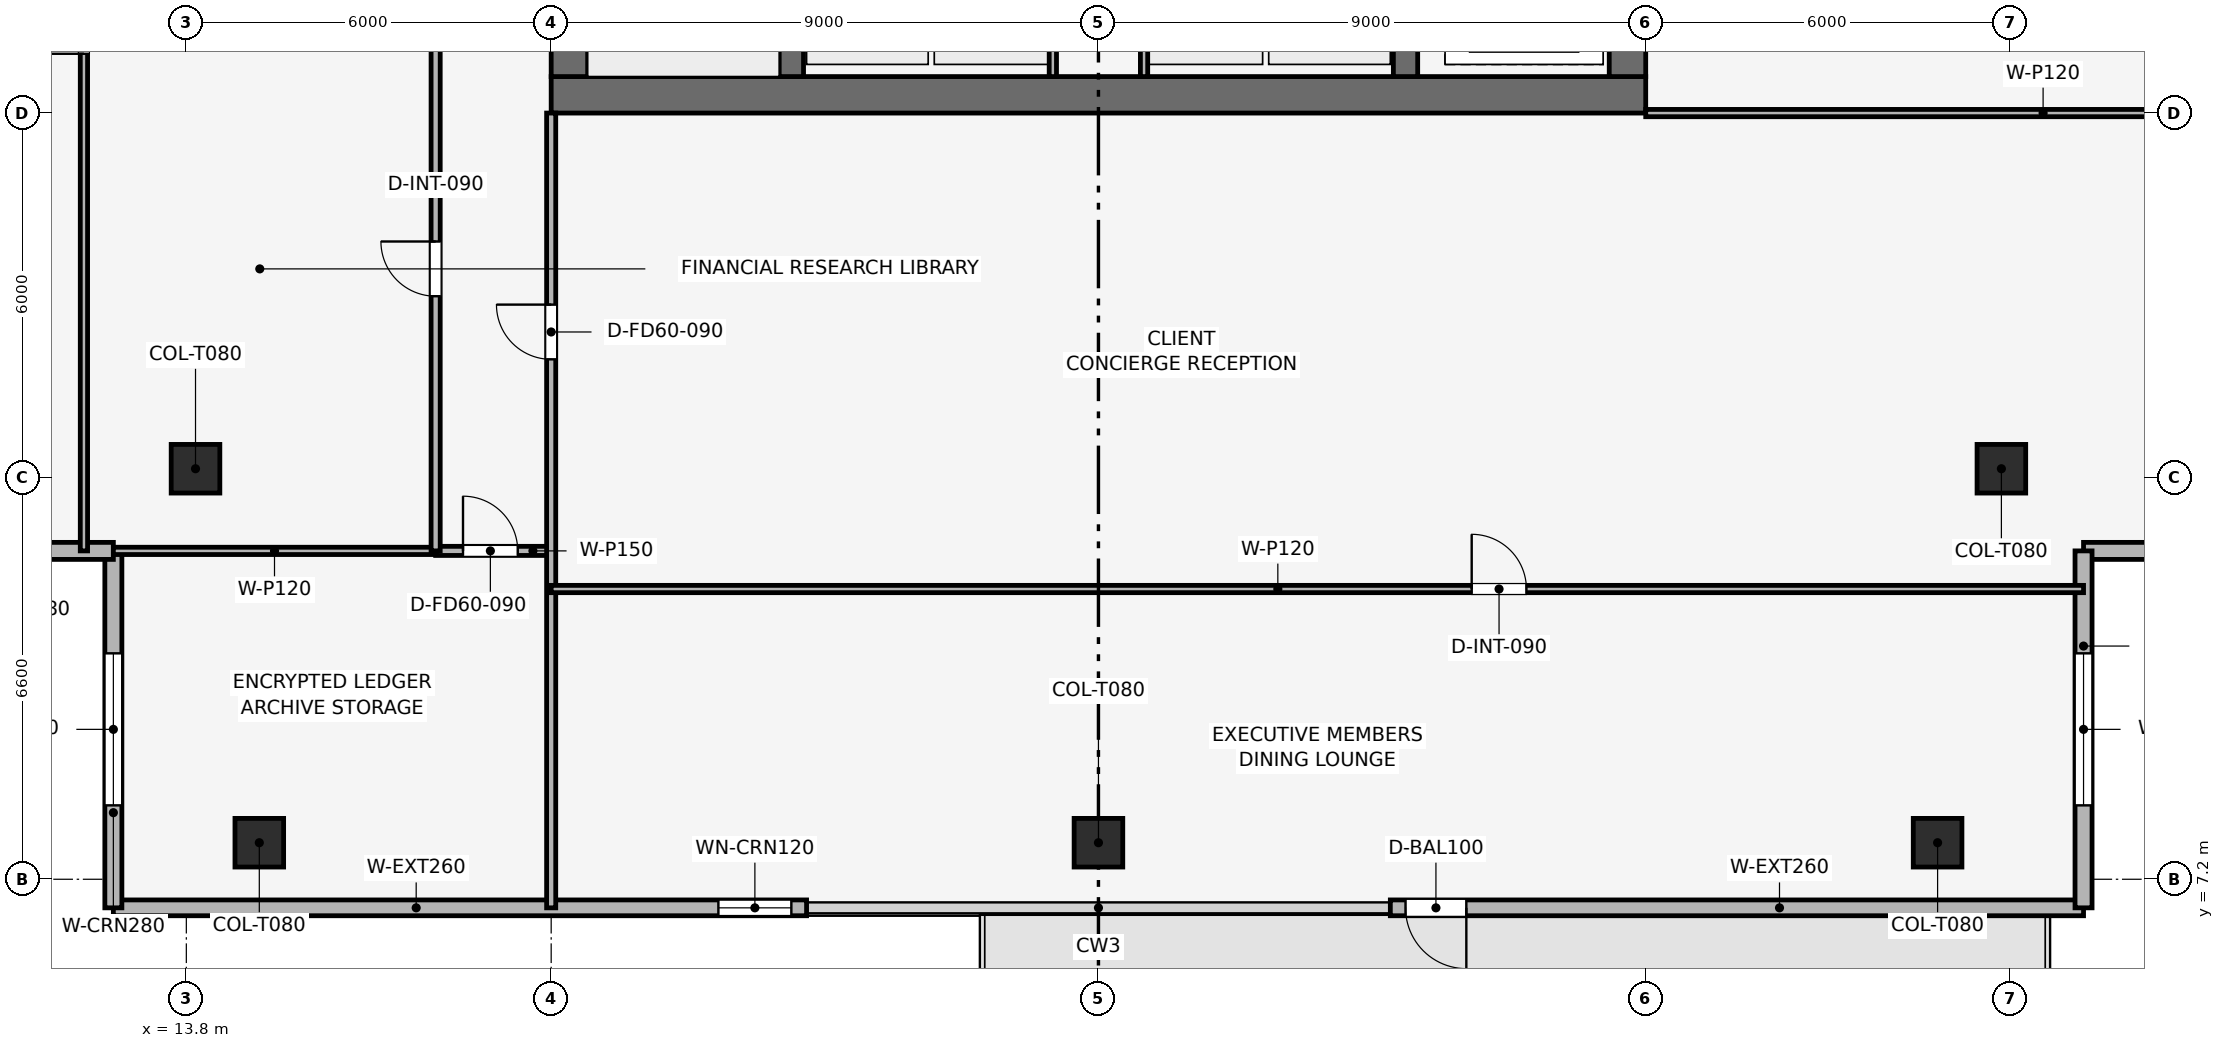
"""IFC4 building model, lengths in metres.
Left out: names, types, materials, properties, quantities, classifications, styles, units other than length and angle.
Written with IfcOpenShell. Run it as: python <this file> out.ifc"""

import sys

from ifc_helpers import new_model, si_unit, direction, frame, frame_2d, origin, origin_2d, place, context, subcontext, project, spatial, rectangle, extrude, element, fill, save


model = new_model("IFC4")
c1 = context("Model", 3, precision=1e-05, world=origin(), true_north=direction((0.0, 1.0)))
c2 = subcontext(c1, "Body", "Model", "MODEL_VIEW")
j1 = project(units=[si_unit("LENGTHUNIT", "METRE"), si_unit("PLANEANGLEUNIT", "RADIAN")], contexts=[c1])
p1 = place(None, origin())
s1 = spatial("IfcSite", under=j1, at=p1, CompositionType="ELEMENT")
p2 = place(p1, origin())
s2 = spatial("IfcBuilding", under=s1, at=p2, CompositionType="ELEMENT")
p3 = place(p2, frame((0.0, 0.0, 340.5)))
s3 = spatial("IfcBuildingStorey", under=s2, at=p3, CompositionType="ELEMENT", Elevation=340.5)
p4 = place(p3, frame((19.8, 20.1, 0.0), z_axis=(0.0, 0.0, 1.0), x_axis=(1.0, 0.0, 0.0)))
e1 = element("IfcWall", 1, at=p4, inside=s3, PredefinedType="SHEAR", context=c2, shape_type="SweptSolid", body=[
    extrude(rectangle(XDim=18.0, YDim=0.6, at=frame_2d((9.0, 0.0))), origin(), (0.0, 0.0, 1.0), 3.75),
])
p5 = place(p3, frame((20.1, 20.4, 0.0), z_axis=(0.0, 0.0, 1.0), x_axis=(0.0, 1.0, 0.0)))
e2 = element("IfcWall", 2, at=p5, inside=s3, PredefinedType="SHEAR", context=c2, shape_type="SweptSolid", body=[
    extrude(rectangle(XDim=16.8, YDim=0.6, at=frame_2d((8.4, 0.0))), origin(), (0.0, 0.0, 1.0), 3.75),
])
p6 = place(p5, frame((10.4, 0.0, 0.0)))
e3 = element("IfcOpeningElement", 3, at=p6, cuts=e2, PredefinedType="OPENING", context=c2, shape_type="SweptSolid", body=[
    extrude(rectangle(XDim=1.1, YDim=2.15, at=frame_2d((0.55, 1.075))), frame((0.0, 0.31, 0.0), z_axis=(0.0, -1.0, 0.0), x_axis=(1.0, 0.0, 0.0)), (0.0, 0.0, 1.0), 0.62),
])
p7 = place(p3, frame((37.5, 20.4, 0.0), z_axis=(0.0, 0.0, 1.0), x_axis=(0.0, 1.0, 0.0)))
e4 = element("IfcWall", 4, at=p7, inside=s3, PredefinedType="SHEAR", context=c2, shape_type="SweptSolid", body=[
    extrude(rectangle(XDim=16.8, YDim=0.6, at=frame_2d((8.4, 0.0))), origin(), (0.0, 0.0, 1.0), 3.75),
])
p8 = place(p7, frame((4.9, 0.0, 0.0)))
e5 = element("IfcOpeningElement", 5, at=p8, cuts=e4, PredefinedType="OPENING", context=c2, shape_type="SweptSolid", body=[
    extrude(rectangle(XDim=1.1, YDim=2.15, at=frame_2d((0.55, 1.075))), frame((0.0, 0.31, 0.0), z_axis=(0.0, -1.0, 0.0), x_axis=(1.0, 0.0, 0.0)), (0.0, 0.0, 1.0), 0.62),
])
for number, where, z_axis, x_axis in (
    (6, (23.75, 20.4, 0.0), (0.0, 0.0, 1.0), (0.0, 1.0, 0.0)),
    (7, (33.85, 20.4, 0.0), (0.0, 0.0, 1.0), (0.0, 1.0, 0.0)),
):
    element("IfcWall", number, at=place(p3, frame(where, z_axis=z_axis, x_axis=x_axis)), inside=s3, PredefinedType="SHEAR", context=c2, shape_type="SweptSolid", body=[
        extrude(rectangle(XDim=16.8, YDim=0.4, at=frame_2d((8.4, 0.0))), origin(), (0.0, 0.0, 1.0), 3.75),
    ])
p9 = place(p3, frame((15.0, 7.801, 0.003), z_axis=(0.026074003672, 0.233311539355, 0.972052401847), x_axis=(-0.993813171993, 0.111064752168, 0.0)))
e8 = element("IfcColumn", 8, at=p9, inside=s3, PredefinedType="COLUMN", context=c2, shape_type="SweptSolid", body=[
    extrude(rectangle(XDim=0.8, YDim=0.8, at=origin_2d()), origin(), (0.0, 0.0, 1.0), 3.605),
])
p10 = place(p3, frame((28.8, 7.801, 0.003), z_axis=(0.0, 0.23339088867, 0.972382997119), x_axis=(-1.0, 0.0, 0.0)))
e9 = element("IfcColumn", 9, at=p10, inside=s3, PredefinedType="COLUMN", context=c2, shape_type="SweptSolid", body=[
    extrude(rectangle(XDim=0.8, YDim=0.8, at=origin_2d()), origin(), (0.0, 0.0, 1.0), 3.604),
])
p11 = place(p3, frame((42.6, 7.801, 0.003), z_axis=(-0.026074003672, 0.233311539355, 0.972052401847), x_axis=(-0.993813171993, -0.111064752168, 0.0)))
e10 = element("IfcColumn", 10, at=p11, inside=s3, PredefinedType="COLUMN", context=c2, shape_type="SweptSolid", body=[
    extrude(rectangle(XDim=0.8, YDim=0.8, at=origin_2d()), origin(), (0.0, 0.0, 1.0), 3.605),
])
p12 = place(p3, frame((13.951, 13.951, 0.003), z_axis=(0.180469443862, 0.180469443862, 0.966882391847), x_axis=(-0.707106781187, 0.707106781187, 0.0)))
e11 = element("IfcColumn", 11, at=p12, inside=s3, PredefinedType="COLUMN", context=c2, shape_type="SweptSolid", body=[
    extrude(rectangle(XDim=0.8, YDim=0.8, at=origin_2d()), origin(), (0.0, 0.0, 1.0), 3.624),
])
p13 = place(p3, frame((43.649, 13.951, 0.003), z_axis=(-0.180404272202, 0.180471637502, 0.966894144479), x_axis=(-0.70723876565, -0.706974772083, 0.0)))
e12 = element("IfcColumn", 12, at=p13, inside=s3, PredefinedType="COLUMN", context=c2, shape_type="SweptSolid", body=[
    extrude(rectangle(XDim=0.8, YDim=0.8, at=origin_2d()), origin(), (0.0, 0.0, 1.0), 3.624),
])
p14 = place(p3, frame((45.0, 6.73, 0.0), z_axis=(0.0, 0.0, 1.0), x_axis=(-1.0, 0.0, 0.0)))
e13 = element("IfcWall", 13, at=p14, inside=s3, PredefinedType="SOLIDWALL", context=c2, shape_type="SweptSolid", body=[
    extrude(rectangle(XDim=11.4, YDim=0.26, at=frame_2d((5.7, 0.0))), origin(), (0.0, 0.0, 1.0), 3.51),
])
p15 = place(p14, frame((10.15, 0.0, 0.0)))
e14 = element("IfcOpeningElement", 14, at=p15, cuts=e13, PredefinedType="OPENING", context=c2, shape_type="SweptSolid", body=[
    extrude(rectangle(XDim=1.0, YDim=2.2, at=frame_2d((0.5, 1.1))), frame((0.0, 0.14, 0.0), z_axis=(0.0, -1.0, 0.0), x_axis=(1.0, 0.0, 0.0)), (0.0, 0.0, 1.0), 0.28),
])
p16 = place(p3, frame((24.0, 6.73, 0.0), z_axis=(0.0, 0.0, 1.0), x_axis=(-1.0, 0.0, 0.0)))
e15 = element("IfcWall", 15, at=p16, inside=s3, PredefinedType="SOLIDWALL", context=c2, shape_type="SweptSolid", body=[
    extrude(rectangle(XDim=11.4, YDim=0.26, at=frame_2d((5.7, 0.0))), origin(), (0.0, 0.0, 1.0), 3.51),
])
p17 = place(p16, frame((0.25, 0.0, 0.9)))
e16 = element("IfcOpeningElement", 16, at=p17, cuts=e15, PredefinedType="OPENING", context=c2, shape_type="SweptSolid", body=[
    extrude(rectangle(XDim=1.2, YDim=2.1, at=frame_2d((0.6, 1.05))), frame((0.0, 0.14, 0.0), z_axis=(0.0, -1.0, 0.0), x_axis=(1.0, 0.0, 0.0)), (0.0, 0.0, 1.0), 0.28),
])
p18 = place(p3, frame((12.6, 6.73, 0.0), z_axis=(0.0, 0.0, 1.0), x_axis=(0.0, 1.0, 0.0)))
e17 = element("IfcWall", 17, at=p18, inside=s3, PredefinedType="SOLIDWALL", context=c2, shape_type="SweptSolid", body=[
    extrude(rectangle(XDim=5.87, YDim=0.28, at=frame_2d((2.935, 0.0))), origin(), (0.0, 0.0, 1.0), 3.51),
])
p19 = place(p18, frame((1.685, 0.0, 0.9)))
e18 = element("IfcOpeningElement", 18, at=p19, cuts=e17, PredefinedType="OPENING", context=c2, shape_type="SweptSolid", body=[
    extrude(rectangle(XDim=2.5, YDim=1.9, at=frame_2d((1.25, 0.95))), frame((0.0, 0.15, 0.0), z_axis=(0.0, -1.0, 0.0), x_axis=(1.0, 0.0, 0.0)), (0.0, 0.0, 1.0), 0.3),
])
p20 = place(p3, frame((12.6, 12.6, 0.0), z_axis=(0.0, 0.0, 1.0), x_axis=(-1.0, 0.0, 0.0)))
e19 = element("IfcWall", 19, at=p20, inside=s3, PredefinedType="SOLIDWALL", context=c2, shape_type="SweptSolid", body=[
    extrude(rectangle(XDim=5.87, YDim=0.28, at=frame_2d((2.935, 0.0))), origin(), (0.0, 0.0, 1.0), 3.51),
])
p21 = place(p20, frame((1.685, 0.0, 0.9)))
e20 = element("IfcOpeningElement", 20, at=p21, cuts=e19, PredefinedType="OPENING", context=c2, shape_type="SweptSolid", body=[
    extrude(rectangle(XDim=2.5, YDim=1.9, at=frame_2d((1.25, 0.95))), frame((0.0, 0.15, 0.0), z_axis=(0.0, -1.0, 0.0), x_axis=(1.0, 0.0, 0.0)), (0.0, 0.0, 1.0), 0.3),
])
p22 = place(p3, frame((50.87, 12.6, 0.0), z_axis=(0.0, 0.0, 1.0), x_axis=(-1.0, 0.0, 0.0)))
e21 = element("IfcWall", 21, at=p22, inside=s3, PredefinedType="SOLIDWALL", context=c2, shape_type="SweptSolid", body=[
    extrude(rectangle(XDim=5.87, YDim=0.28, at=frame_2d((2.935, 0.0))), origin(), (0.0, 0.0, 1.0), 3.51),
])
p23 = place(p22, frame((1.685, 0.0, 0.9)))
e22 = element("IfcOpeningElement", 22, at=p23, cuts=e21, PredefinedType="OPENING", context=c2, shape_type="SweptSolid", body=[
    extrude(rectangle(XDim=2.5, YDim=1.9, at=frame_2d((1.25, 0.95))), frame((0.0, 0.15, 0.0), z_axis=(0.0, -1.0, 0.0), x_axis=(1.0, 0.0, 0.0)), (0.0, 0.0, 1.0), 0.3),
])
p24 = place(p3, frame((45.0, 12.6, 0.0), z_axis=(0.0, 0.0, 1.0), x_axis=(0.0, -1.0, 0.0)))
e23 = element("IfcWall", 23, at=p24, inside=s3, PredefinedType="SOLIDWALL", context=c2, shape_type="SweptSolid", body=[
    extrude(rectangle(XDim=5.87, YDim=0.28, at=frame_2d((2.935, 0.0))), origin(), (0.0, 0.0, 1.0), 3.51),
])
p25 = place(p24, frame((1.685, 0.0, 0.9)))
e24 = element("IfcOpeningElement", 24, at=p25, cuts=e23, PredefinedType="OPENING", context=c2, shape_type="SweptSolid", body=[
    extrude(rectangle(XDim=2.5, YDim=1.9, at=frame_2d((1.25, 0.95))), frame((0.0, 0.15, 0.0), z_axis=(0.0, -1.0, 0.0), x_axis=(1.0, 0.0, 0.0)), (0.0, 0.0, 1.0), 0.3),
])
for number, where, z_axis, x_axis in (
    (25, (28.05, 20.4, 0.0), (0.0, 0.0, 1.0), (0.0, 1.0, 0.0)),
    (26, (29.55, 20.4, 0.0), (0.0, 0.0, 1.0), (0.0, 1.0, 0.0)),
):
    element("IfcWall", number, at=place(p3, frame(where, z_axis=z_axis, x_axis=x_axis)), inside=s3, PredefinedType="PARTITIONING", context=c2, shape_type="SweptSolid", body=[
        extrude(rectangle(XDim=8.15, YDim=0.12, at=frame_2d((4.075, 0.0))), origin(), (0.0, 0.0, 1.0), 3.51),
    ])
p26 = place(p3, frame((12.116, 12.6, 0.0), z_axis=(0.0, 0.0, 1.0), x_axis=(0.0, 1.0, 0.0)))
e27 = element("IfcWall", 27, at=p26, inside=s3, PredefinedType="PARTITIONING", context=c2, shape_type="SweptSolid", body=[
    extrude(rectangle(XDim=9.275, YDim=0.12, at=frame_2d((4.637, 0.0))), origin(), (0.0, 0.0, 1.0), 3.095),
])
p27 = place(p26, frame((8.175, 0.0, 0.0)))
e28 = element("IfcOpeningElement", 28, at=p27, cuts=e27, PredefinedType="OPENING", context=c2, shape_type="SweptSolid", body=[
    extrude(rectangle(XDim=0.9, YDim=2.1, at=frame_2d((0.45, 1.05))), frame((0.0, 0.07, 0.0), z_axis=(0.0, -1.0, 0.0), x_axis=(1.0, 0.0, 0.0)), (0.0, 0.0, 1.0), 0.14),
])
p28 = place(p3, frame((12.6, 12.6, 0.0), z_axis=(0.0, 0.0, 1.0), x_axis=(1.0, 0.0, 0.0)))
e29 = element("IfcWall", 29, at=p28, inside=s3, PredefinedType="PARTITIONING", context=c2, shape_type="SweptSolid", body=[
    extrude(rectangle(XDim=5.3, YDim=0.12, at=frame_2d((2.65, 0.0))), origin(), (0.0, 0.0, 1.0), 3.195),
])
p29 = place(p3, frame((17.9, 12.6, 0.0), z_axis=(0.0, 0.0, 1.0), x_axis=(1.0, 0.0, 0.0)))
e30 = element("IfcWall", 30, at=p29, inside=s3, PredefinedType="PARTITIONING", context=c2, shape_type="SweptSolid", body=[
    extrude(rectangle(XDim=1.9, YDim=0.15, at=frame_2d((0.95, 0.0))), origin(), (0.0, 0.0, 1.0), 3.51),
])
p30 = place(p29, frame((0.45, 0.0, 0.0)))
e31 = element("IfcOpeningElement", 31, at=p30, cuts=e30, PredefinedType="OPENING", context=c2, shape_type="SweptSolid", body=[
    extrude(rectangle(XDim=0.9, YDim=2.1, at=frame_2d((0.45, 1.05))), frame((0.0, 0.085, 0.0), z_axis=(0.0, -1.0, 0.0), x_axis=(1.0, 0.0, 0.0)), (0.0, 0.0, 1.0), 0.17),
])
p31 = place(p3, frame((19.8, 6.73, 0.0), z_axis=(0.0, 0.0, 1.0), x_axis=(0.0, 1.0, 0.0)))
e32 = element("IfcWall", 32, at=p31, inside=s3, PredefinedType="PARTITIONING", context=c2, shape_type="SweptSolid", body=[
    extrude(rectangle(XDim=13.07, YDim=0.15, at=frame_2d((6.535, 0.0))), origin(), (0.0, 0.0, 1.0), 3.095),
])
p32 = place(p31, frame((9.02, 0.0, 0.0)))
e33 = element("IfcOpeningElement", 33, at=p32, cuts=e32, PredefinedType="OPENING", context=c2, shape_type="SweptSolid", body=[
    extrude(rectangle(XDim=0.9, YDim=2.1, at=frame_2d((0.45, 1.05))), frame((0.0, 0.085, 0.0), z_axis=(0.0, -1.0, 0.0), x_axis=(1.0, 0.0, 0.0)), (0.0, 0.0, 1.0), 0.17),
])
p33 = place(p3, frame((19.8, 11.973, 0.0), z_axis=(0.0, 0.0, 1.0), x_axis=(1.0, 0.0, 0.0)))
e34 = element("IfcWall", 34, at=p33, inside=s3, PredefinedType="PARTITIONING", context=c2, shape_type="SweptSolid", body=[
    extrude(rectangle(XDim=25.2, YDim=0.12, at=frame_2d((12.6, 0.0))), origin(), (0.0, 0.0, 1.0), 3.095),
])
p34 = place(p33, frame((15.138, 0.0, 0.0)))
e35 = element("IfcOpeningElement", 35, at=p34, cuts=e34, PredefinedType="OPENING", context=c2, shape_type="SweptSolid", body=[
    extrude(rectangle(XDim=0.9, YDim=2.1, at=frame_2d((0.45, 1.05))), frame((0.0, 0.07, 0.0), z_axis=(0.0, -1.0, 0.0), x_axis=(1.0, 0.0, 0.0)), (0.0, 0.0, 1.0), 0.14),
])
p35 = place(p3, frame((37.8, 19.8, 0.0), z_axis=(0.0, 0.0, 1.0), x_axis=(1.0, 0.0, 0.0)))
e36 = element("IfcWall", 36, at=p35, inside=s3, PredefinedType="PARTITIONING", context=c2, shape_type="SweptSolid", body=[
    extrude(rectangle(XDim=13.07, YDim=0.12, at=frame_2d((6.535, 0.0))), origin(), (0.0, 0.0, 1.0), 3.095),
])
p36 = place(p3, frame((17.9, 12.6, 0.0), z_axis=(0.0, 0.0, 1.0), x_axis=(0.0, 1.0, 0.0)))
e37 = element("IfcWall", 37, at=p36, inside=s3, PredefinedType="PARTITIONING", context=c2, shape_type="SweptSolid", body=[
    extrude(rectangle(XDim=27.1, YDim=0.15, at=frame_2d((13.55, 0.0))), origin(), (0.0, 0.0, 1.0), 3.095),
])
p37 = place(p36, frame((4.188, 0.0, 0.0)))
e38 = element("IfcOpeningElement", 38, at=p37, cuts=e37, PredefinedType="OPENING", context=c2, shape_type="SweptSolid", body=[
    extrude(rectangle(XDim=0.9, YDim=2.1, at=frame_2d((0.45, 1.05))), frame((0.0, 0.085, 0.0), z_axis=(0.0, -1.0, 0.0), x_axis=(1.0, 0.0, 0.0)), (0.0, 0.0, 1.0), 0.17),
])
p38 = place(p36, frame((17.738, 0.0, 0.0)))
e39 = element("IfcOpeningElement", 39, at=p38, cuts=e37, PredefinedType="OPENING", context=c2, shape_type="SweptSolid", body=[
    extrude(rectangle(XDim=0.9, YDim=2.1, at=frame_2d((0.45, 1.05))), frame((0.0, 0.085, 0.0), z_axis=(0.0, -1.0, 0.0), x_axis=(1.0, 0.0, 0.0)), (0.0, 0.0, 1.0), 0.17),
])
p39 = place(p15, origin())
e40 = element("IfcDoor", 40, at=p39, inside=s3, OperationType="SINGLE_SWING_LEFT", PredefinedType="DOOR", context=c2, shape_type="SweptSolid", body=[
    extrude(rectangle(XDim=1.0, YDim=2.2, at=frame_2d((0.5, 1.1))), frame((0.0, 0.025, 0.0), z_axis=(0.0, -1.0, 0.0), x_axis=(1.0, 0.0, 0.0)), (0.0, 0.0, 1.0), 0.05),
])
fill(e14, e40)
p40 = place(p17, origin())
e41 = element("IfcWindow", 41, at=p40, inside=s3, PartitioningType="SINGLE_PANEL", PredefinedType="WINDOW", context=c2, shape_type="SweptSolid", body=[
    extrude(rectangle(XDim=1.2, YDim=2.1, at=frame_2d((0.6, 1.05))), frame((0.0, 0.03, 0.0), z_axis=(0.0, -1.0, 0.0), x_axis=(1.0, 0.0, 0.0)), (0.0, 0.0, 1.0), 0.06),
])
fill(e16, e41)
p41 = place(p19, origin())
e42 = element("IfcWindow", 42, at=p41, inside=s3, PartitioningType="SINGLE_PANEL", PredefinedType="WINDOW", context=c2, shape_type="SweptSolid", body=[
    extrude(rectangle(XDim=2.5, YDim=1.9, at=frame_2d((1.25, 0.95))), frame((0.0, 0.03, 0.0), z_axis=(0.0, -1.0, 0.0), x_axis=(1.0, 0.0, 0.0)), (0.0, 0.0, 1.0), 0.06),
])
fill(e18, e42)
p42 = place(p25, origin())
e43 = element("IfcWindow", 43, at=p42, inside=s3, PartitioningType="SINGLE_PANEL", PredefinedType="WINDOW", context=c2, shape_type="SweptSolid", body=[
    extrude(rectangle(XDim=2.5, YDim=1.9, at=frame_2d((1.25, 0.95))), frame((0.0, 0.03, 0.0), z_axis=(0.0, -1.0, 0.0), x_axis=(1.0, 0.0, 0.0)), (0.0, 0.0, 1.0), 0.06),
])
fill(e24, e43)
p43 = place(p27, origin())
e44 = element("IfcDoor", 44, at=p43, inside=s3, OperationType="SINGLE_SWING_LEFT", PredefinedType="DOOR", context=c2, shape_type="SweptSolid", body=[
    extrude(rectangle(XDim=0.9, YDim=2.1, at=frame_2d((0.45, 1.05))), frame((0.0, 0.025, 0.0), z_axis=(0.0, -1.0, 0.0), x_axis=(1.0, 0.0, 0.0)), (0.0, 0.0, 1.0), 0.05),
])
fill(e28, e44)
p44 = place(p30, origin())
e45 = element("IfcDoor", 45, at=p44, inside=s3, OperationType="SINGLE_SWING_LEFT", PredefinedType="DOOR", context=c2, shape_type="SweptSolid", body=[
    extrude(rectangle(XDim=0.9, YDim=2.1, at=frame_2d((0.45, 1.05))), frame((0.0, 0.025, 0.0), z_axis=(0.0, -1.0, 0.0), x_axis=(1.0, 0.0, 0.0)), (0.0, 0.0, 1.0), 0.05),
])
fill(e31, e45)
p45 = place(p32, origin())
e46 = element("IfcDoor", 46, at=p45, inside=s3, OperationType="SINGLE_SWING_RIGHT", PredefinedType="DOOR", context=c2, shape_type="SweptSolid", body=[
    extrude(rectangle(XDim=0.9, YDim=2.1, at=frame_2d((0.45, 1.05))), frame((0.0, 0.025, 0.0), z_axis=(0.0, -1.0, 0.0), x_axis=(1.0, 0.0, 0.0)), (0.0, 0.0, 1.0), 0.05),
])
fill(e33, e46)
p46 = place(p34, origin())
e47 = element("IfcDoor", 47, at=p46, inside=s3, OperationType="SINGLE_SWING_LEFT", PredefinedType="DOOR", context=c2, shape_type="SweptSolid", body=[
    extrude(rectangle(XDim=0.9, YDim=2.1, at=frame_2d((0.45, 1.05))), frame((0.0, 0.025, 0.0), z_axis=(0.0, -1.0, 0.0), x_axis=(1.0, 0.0, 0.0)), (0.0, 0.0, 1.0), 0.05),
])
fill(e35, e47)
p47 = place(p37, origin())
e48 = element("IfcDoor", 48, at=p47, inside=s3, OperationType="SINGLE_SWING_RIGHT", PredefinedType="DOOR", context=c2, shape_type="SweptSolid", body=[
    extrude(rectangle(XDim=0.9, YDim=2.1, at=frame_2d((0.45, 1.05))), frame((0.0, 0.025, 0.0), z_axis=(0.0, -1.0, 0.0), x_axis=(1.0, 0.0, 0.0)), (0.0, 0.0, 1.0), 0.05),
])
fill(e38, e48)
save(model, sys.argv[1])
